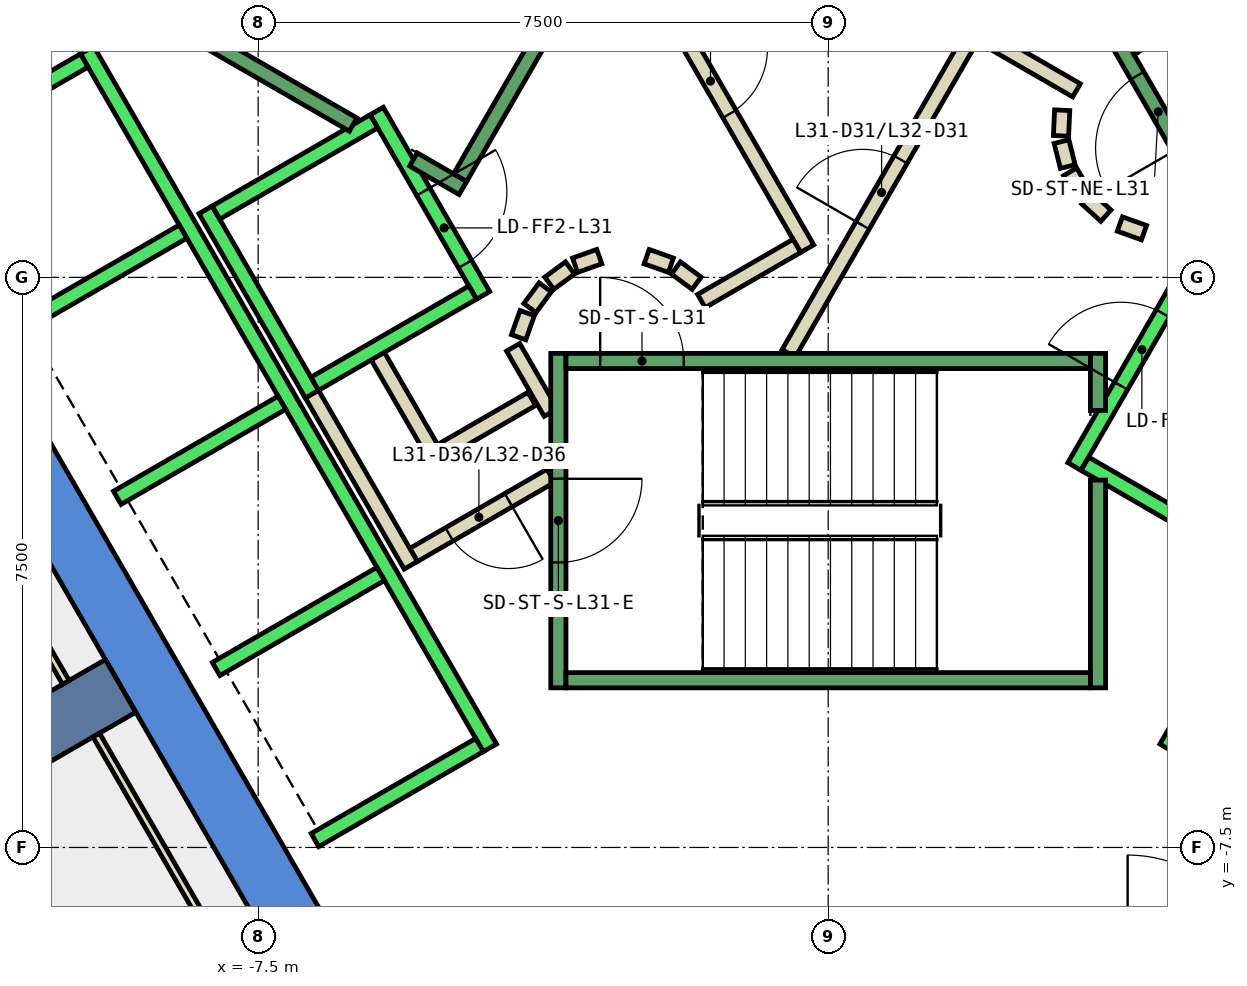
"""IFC4 building model, lengths in metres.
Left out: names, types, materials, properties, quantities, classifications, styles, units other than length and angle.
Written with IfcOpenShell. Run it as: python <this file> out.ifc"""

import sys

from ifc_helpers import new_model, si_unit, direction, frame, frame_2d, origin, place, context, subcontext, project, spatial, polyline, rectangle, outline, extrude, element, fill, save


model = new_model("IFC4")
c1 = context("Model", 3, precision=1e-05, world=origin(), true_north=direction((0.0, 1.0)))
c2 = subcontext(c1, "Body", "Model", "MODEL_VIEW")
j1 = project(units=[si_unit("LENGTHUNIT", "METRE"), si_unit("PLANEANGLEUNIT", "RADIAN")], contexts=[c1])
p1 = place(None, origin())
s1 = spatial("IfcSite", under=j1, at=p1, CompositionType="ELEMENT")
p2 = place(p1, origin())
s2 = spatial("IfcBuilding", under=s1, at=p2, CompositionType="ELEMENT")
p3 = place(p2, frame((0.0, 0.0, 142.4)))
s3 = spatial("IfcBuildingStorey", under=s2, at=p3, CompositionType="ELEMENT", Elevation=142.4)
p4 = place(p3, frame((0.0, 0.0, -0.4)))
e1 = element("IfcWall", 1, at=p4, inside=s3, PredefinedType="SHEAR", context=c2, shape_type="SweptSolid", body=[
    extrude(outline(polyline([(-13.856, 2.5), (-6.928, -9.5), (-6.466, -8.7), (-12.933, 2.5), (-13.856, 2.5)])), origin(), (0.0, 0.0, 1.0), 4.2),
])
p5 = place(p3, frame((-9.31, -5.375, -0.4), z_axis=(0.0, 0.0, 1.0), x_axis=(-0.866017533419, -0.500013631625, 0.0)))
e2 = element("IfcWall", 2, at=p5, inside=s3, PredefinedType="SHEAR", context=c2, shape_type="SweptSolid", body=[
    extrude(rectangle(XDim=9.0, YDim=0.8, at=frame_2d((4.5, 0.0))), origin(), (0.0, 0.0, 1.0), 4.2),
])
p6 = place(p3, frame((-3.9, -1.599, 0.0), z_axis=(0.0, 0.0, 1.0), x_axis=(-0.865969445389, -0.500096910261, 0.0)))
e3 = element("IfcWall", 3, at=p6, inside=s3, PredefinedType="PARTITIONING", context=c2, shape_type="SweptSolid", body=[
    extrude(rectangle(XDim=1.373, YDim=0.2, at=frame_2d((0.687, 0.0))), origin(), (0.0, 0.0, 1.0), 3.8),
])
p7 = place(p3, frame((-5.126, -2.422, 0.0), z_axis=(0.0, 0.0, 1.0), x_axis=(-0.500062241894, 0.865989465428, 0.0)))
e4 = element("IfcWall", 4, at=p7, inside=s3, PredefinedType="PARTITIONING", context=c2, shape_type="SweptSolid", body=[
    extrude(rectangle(XDim=1.7, YDim=0.2, at=frame_2d((0.85, 0.0))), origin(), (0.0, 0.0, 1.0), 3.8),
])
p8 = place(p3, frame((-3.65, -2.61, 0.0), z_axis=(0.0, 0.0, 1.0), x_axis=(-0.866072462134, -0.499918483688, 0.0)))
e5 = element("IfcWall", 5, at=p8, inside=s3, PredefinedType="PARTITIONING", context=c2, shape_type="SweptSolid", body=[
    extrude(rectangle(XDim=2.084, YDim=0.2, at=frame_2d((1.042, 0.0))), origin(), (0.0, 0.0, 1.0), 3.8),
])
p9 = place(p8, frame((0.642, 0.0, 0.0)))
e6 = element("IfcOpeningElement", 6, at=p9, cuts=e5, PredefinedType="OPENING", context=c2, shape_type="SweptSolid", body=[
    extrude(rectangle(XDim=0.9, YDim=2.1, at=frame_2d((0.45, 1.05))), frame((0.0, 0.11, 0.0), z_axis=(0.0, -1.0, 0.0), x_axis=(1.0, 0.0, 0.0)), (0.0, 0.0, 1.0), 0.22),
])
p10 = place(p3, frame((-5.492, -3.788, 0.0), z_axis=(0.0, 0.0, 1.0), x_axis=(-0.500008949224, 0.866020236886, 0.0)))
e7 = element("IfcWall", 7, at=p10, inside=s3, PredefinedType="PARTITIONING", context=c2, shape_type="SweptSolid", body=[
    extrude(rectangle(XDim=2.68, YDim=0.2, at=frame_2d((1.34, 0.0))), origin(), (0.0, 0.0, 1.0), 3.8),
])
p11 = place(p3, frame((-4.145, -0.92, 0.0), z_axis=(0.0, 0.0, 1.0), x_axis=(0.499743786207, -0.866173278362, 0.0)))
e8 = element("IfcWall", 8, at=p11, inside=s3, PredefinedType="PARTITIONING", context=c2, shape_type="SweptSolid", body=[
    extrude(rectangle(XDim=0.991, YDim=0.2, at=frame_2d((0.495, 0.0))), origin(), (0.0, 0.0, 1.0), 3.8),
])
p12 = place(p3, frame((-0.52, -1.0, 0.0), z_axis=(0.0, 0.0, 1.0), x_axis=(0.50011622646, 0.865958290007, 0.0)))
e9 = element("IfcWall", 9, at=p12, inside=s3, PredefinedType="PARTITIONING", context=c2, shape_type="SweptSolid", body=[
    extrude(rectangle(XDim=4.991, YDim=0.2, at=frame_2d((2.496, 0.0))), origin(), (0.0, 0.0, 1.0), 3.8),
])
p13 = place(p12, frame((1.945, 0.0, 0.0)))
e10 = element("IfcOpeningElement", 10, at=p13, cuts=e9, PredefinedType="OPENING", context=c2, shape_type="SweptSolid", body=[
    extrude(rectangle(XDim=1.0, YDim=2.1, at=frame_2d((0.5, 1.05))), frame((0.0, 0.11, 0.0), z_axis=(0.0, -1.0, 0.0), x_axis=(1.0, 0.0, 0.0)), (0.0, 0.0, 1.0), 0.22),
])
p14 = place(p3, frame((2.012, 3.186, 0.0), z_axis=(0.0, 0.0, 1.0), x_axis=(0.865891012941, -0.500232699559, 0.0)))
e11 = element("IfcWall", 11, at=p14, inside=s3, PredefinedType="PARTITIONING", context=c2, shape_type="SweptSolid", body=[
    extrude(rectangle(XDim=1.449, YDim=0.2, at=frame_2d((0.725, 0.0))), origin(), (0.0, 0.0, 1.0), 3.8),
])
p15 = place(p3, frame((3.079, 2.199, 0.0), z_axis=(0.0, 0.0, 1.0), x_axis=(-0.047771483479, -0.998858290933, 0.0)))
e12 = element("IfcWall", 12, at=p15, inside=s3, PredefinedType="PARTITIONING", context=c2, shape_type="SweptSolid", body=[
    extrude(rectangle(XDim=0.337, YDim=0.2, at=frame_2d((0.169, 0.0))), origin(), (0.0, 0.0, 1.0), 3.8),
])
p16 = place(p3, frame((3.07, 1.786, 0.0), z_axis=(0.0, 0.0, 1.0), x_axis=(0.242705583207, -0.970099994784, 0.0)))
e13 = element("IfcWall", 13, at=p16, inside=s3, PredefinedType="PARTITIONING", context=c2, shape_type="SweptSolid", body=[
    extrude(rectangle(XDim=0.338, YDim=0.2, at=frame_2d((0.169, 0.0))), origin(), (0.0, 0.0, 1.0), 3.8),
])
for number, where, z_axis, x_axis in (
    (14, (3.182, 1.388, 0.0), (0.0, 0.0, 1.0), (0.512, -0.859, 0.0)),
    (15, (3.404, 1.039, 0.0), (0.0, 0.0, 1.0), (0.74, -0.672, 0.0)),
):
    element("IfcWall", number, at=place(p3, frame(where, z_axis=z_axis, x_axis=x_axis)), inside=s3, PredefinedType="PARTITIONING", context=c2, shape_type="SweptSolid", body=[
        extrude(rectangle(XDim=0.338, YDim=0.2, at=frame_2d((0.169, 0.0))), origin(), (0.0, 0.0, 1.0), 3.8),
    ])
p17 = place(p3, frame((3.838, 0.702, 0.0), z_axis=(0.0, 0.0, 1.0), x_axis=(0.941035081519, -0.338308993895, 0.0)))
e16 = element("IfcWall", 16, at=p17, inside=s3, PredefinedType="PARTITIONING", context=c2, shape_type="SweptSolid", body=[
    extrude(rectangle(XDim=0.337, YDim=0.2, at=frame_2d((0.168, 0.0))), origin(), (0.0, 0.0, 1.0), 3.8),
])
p18 = place(p3, frame((-2.771, 4.7, 0.0), z_axis=(0.0, 0.0, 1.0), x_axis=(0.499969479948, -0.866043023828, 0.0)))
e17 = element("IfcWall", 17, at=p18, inside=s3, PredefinedType="PARTITIONING", context=c2, shape_type="SweptSolid", body=[
    extrude(rectangle(XDim=4.99, YDim=0.2, at=frame_2d((2.495, 0.0))), origin(), (0.0, 0.0, 1.0), 3.8),
])
p19 = place(p18, frame((1.945, 0.0, 0.0)))
e18 = element("IfcOpeningElement", 18, at=p19, cuts=e17, PredefinedType="OPENING", context=c2, shape_type="SweptSolid", body=[
    extrude(rectangle(XDim=1.0, YDim=2.1, at=frame_2d((0.5, 1.05))), frame((0.0, 0.11, 0.0), z_axis=(0.0, -1.0, 0.0), x_axis=(1.0, 0.0, 0.0)), (0.0, 0.0, 1.0), 0.22),
])
p20 = place(p3, frame((-0.412, 0.414, 0.0), z_axis=(0.0, 0.0, 1.0), x_axis=(-0.866017369001, -0.500013916395, 0.0)))
e19 = element("IfcWall", 19, at=p20, inside=s3, PredefinedType="PARTITIONING", context=c2, shape_type="SweptSolid", body=[
    extrude(rectangle(XDim=1.45, YDim=0.2, at=frame_2d((0.725, 0.0))), origin(), (0.0, 0.0, 1.0), 3.8),
])
p21 = place(p3, frame((-1.731, -0.077, 0.0), z_axis=(0.0, 0.0, 1.0), x_axis=(-0.804311165252, 0.594208338422, 0.0)))
e20 = element("IfcWall", 20, at=p21, inside=s3, PredefinedType="PARTITIONING", context=c2, shape_type="SweptSolid", body=[
    extrude(rectangle(XDim=0.338, YDim=0.2, at=frame_2d((0.169, 0.0))), origin(), (0.0, 0.0, 1.0), 3.8),
])
p22 = place(p3, frame((-2.07, 0.16, 0.0), z_axis=(0.0, 0.0, 1.0), x_axis=(-0.942199461132, 0.335052496547, 0.0)))
e21 = element("IfcWall", 21, at=p22, inside=s3, PredefinedType="PARTITIONING", context=c2, shape_type="SweptSolid", body=[
    extrude(rectangle(XDim=0.337, YDim=0.2, at=frame_2d((0.169, 0.0))), origin(), (0.0, 0.0, 1.0), 3.8),
])
p23 = place(p3, frame((-3.012, 0.273, 0.0), z_axis=(0.0, 0.0, 1.0), x_axis=(-0.942280615813, -0.334824194261, 0.0)))
e22 = element("IfcWall", 22, at=p23, inside=s3, PredefinedType="PARTITIONING", context=c2, shape_type="SweptSolid", body=[
    extrude(rectangle(XDim=0.338, YDim=0.2, at=frame_2d((0.169, 0.0))), origin(), (0.0, 0.0, 1.0), 3.8),
])
p24 = place(p3, frame((-3.397, 0.124, 0.0), z_axis=(0.0, 0.0, 1.0), x_axis=(-0.804311165252, -0.594208338422, 0.0)))
e23 = element("IfcWall", 23, at=p24, inside=s3, PredefinedType="PARTITIONING", context=c2, shape_type="SweptSolid", body=[
    extrude(rectangle(XDim=0.338, YDim=0.2, at=frame_2d((0.169, 0.0))), origin(), (0.0, 0.0, 1.0), 3.8),
])
p25 = place(p3, frame((-3.723, -0.131, 0.0), z_axis=(0.0, 0.0, 1.0), x_axis=(-0.594675113454, -0.803966112121, 0.0)))
e24 = element("IfcWall", 24, at=p25, inside=s3, PredefinedType="PARTITIONING", context=c2, shape_type="SweptSolid", body=[
    extrude(rectangle(XDim=0.338, YDim=0.2, at=frame_2d((0.169, 0.0))), origin(), (0.0, 0.0, 1.0), 3.8),
])
p26 = place(p3, frame((-3.96, -0.47, 0.0), z_axis=(0.0, 0.0, 1.0), x_axis=(-0.334824194261, -0.942280615813, 0.0)))
e25 = element("IfcWall", 25, at=p26, inside=s3, PredefinedType="PARTITIONING", context=c2, shape_type="SweptSolid", body=[
    extrude(rectangle(XDim=0.338, YDim=0.2, at=frame_2d((0.169, 0.0))), origin(), (0.0, 0.0, 1.0), 3.8),
])
p27 = place(p3, frame((-7.572, -9.586, 0.0), z_axis=(0.0, 0.0, 1.0), x_axis=(-0.500037407586, 0.866003805427, 0.0)))
e26 = element("IfcWall", 26, at=p27, inside=s3, PredefinedType="PARTITIONING", context=c2, shape_type="SweptSolid", body=[
    extrude(rectangle(XDim=4.115, YDim=0.1, at=frame_2d((2.058, 0.0))), origin(), (0.0, 0.0, 1.0), 3.8),
])
p28 = place(p3, frame((-10.03, -5.329, 0.0), z_axis=(0.0, 0.0, 1.0), x_axis=(-0.499352927503, 0.866398669086, 0.0)))
e27 = element("IfcWall", 27, at=p28, inside=s3, PredefinedType="PARTITIONING", context=c2, shape_type="SweptSolid", body=[
    extrude(rectangle(XDim=0.515, YDim=0.1, at=frame_2d((0.257, 0.0))), origin(), (0.0, 0.0, 1.0), 3.8),
])
p29 = place(p3, frame((-5.94, 2.188, 0.0), z_axis=(0.0, 0.0, 1.0), x_axis=(0.49994636267, -0.866056369097, 0.0)))
e28 = element("IfcWall", 28, at=p29, inside=s3, PredefinedType="STANDARD", context=c2, shape_type="SweptSolid", body=[
    extrude(rectangle(XDim=2.8, YDim=0.2, at=frame_2d((1.4, 0.0))), origin(), (0.0, 0.0, 1.0), 3.8),
])
p30 = place(p29, frame((1.225, 0.0, 0.0)))
e29 = element("IfcOpeningElement", 29, at=p30, cuts=e28, PredefinedType="OPENING", context=c2, shape_type="SweptSolid", body=[
    extrude(rectangle(XDim=1.1, YDim=2.1, at=frame_2d((0.55, 1.05))), frame((0.0, 0.11, 0.0), z_axis=(0.0, -1.0, 0.0), x_axis=(1.0, 0.0, 0.0)), (0.0, 0.0, 1.0), 0.22),
])
p31 = place(p3, frame((-8.192, 0.888, 0.0), z_axis=(0.0, 0.0, 1.0), x_axis=(0.49994636267, -0.866056369097, 0.0)))
e30 = element("IfcWall", 30, at=p31, inside=s3, PredefinedType="STANDARD", context=c2, shape_type="SweptSolid", body=[
    extrude(rectangle(XDim=2.8, YDim=0.2, at=frame_2d((1.4, 0.0))), origin(), (0.0, 0.0, 1.0), 3.8),
])
for number, where, z_axis, x_axis in (
    (31, (-5.977, 2.052, 0.0), (0.0, 0.0, 1.0), (-0.866, -0.5, 0.0)),
    (32, (-4.677, -0.2, 0.0), (0.0, 0.0, 1.0), (-0.866, -0.5, 0.0)),
):
    element("IfcWall", number, at=place(p3, frame(where, z_axis=z_axis, x_axis=x_axis)), inside=s3, PredefinedType="STANDARD", context=c2, shape_type="SweptSolid", body=[
        extrude(rectangle(XDim=2.399, YDim=0.2, at=frame_2d((1.2, 0.0))), origin(), (0.0, 0.0, 1.0), 3.8),
    ])
p32 = place(p3, frame((-9.751, 2.99, 0.0), z_axis=(0.0, 0.0, 1.0), x_axis=(0.50000090737, -0.866024879913, 0.0)))
e33 = element("IfcWall", 33, at=p32, inside=s3, PredefinedType="STANDARD", context=c2, shape_type="SweptSolid", body=[
    extrude(rectangle(XDim=10.6, YDim=0.2, at=frame_2d((5.3, 0.0))), origin(), (0.0, 0.0, 1.0), 3.8),
])
p33 = place(p3, frame((-9.788, 2.853, 0.0), z_axis=(0.0, 0.0, 1.0), x_axis=(-0.865998541277, -0.500046524342, 0.0)))
e34 = element("IfcWall", 34, at=p33, inside=s3, PredefinedType="STANDARD", context=c2, shape_type="SweptSolid", body=[
    extrude(rectangle(XDim=2.5, YDim=0.2, at=frame_2d((1.25, 0.0))), origin(), (0.0, 0.0, 1.0), 3.8),
])
for number, where, z_axis, x_axis in (
    (35, (-8.488, 0.602, 0.0), (0.0, 0.0, 1.0), (-0.866, -0.5, 0.0)),
    (36, (-7.188, -1.65, 0.0), (0.0, 0.0, 1.0), (-0.866, -0.5, 0.0)),
    (37, (-5.888, -3.902, 0.0), (0.0, 0.0, 1.0), (-0.866, -0.5, 0.0)),
    (38, (-4.588, -6.153, 0.0), (0.0, 0.0, 1.0), (-0.866, -0.5, 0.0)),
):
    element("IfcWall", number, at=place(p3, frame(where, z_axis=z_axis, x_axis=x_axis)), inside=s3, PredefinedType="STANDARD", context=c2, shape_type="SweptSolid", body=[
        extrude(rectangle(XDim=2.5, YDim=0.2, at=frame_2d((1.25, 0.0))), origin(), (0.0, 0.0, 1.0), 3.8),
    ])
p34 = place(p3, frame((3.24, -2.488, 0.0), z_axis=(0.0, 0.0, 1.0), x_axis=(0.49994636267, 0.866056369097, 0.0)))
e39 = element("IfcWall", 39, at=p34, inside=s3, PredefinedType="STANDARD", context=c2, shape_type="SweptSolid", body=[
    extrude(rectangle(XDim=2.8, YDim=0.2, at=frame_2d((1.4, 0.0))), origin(), (0.0, 0.0, 1.0), 3.8),
])
p35 = place(p34, frame((1.225, 0.0, 0.0)))
e40 = element("IfcOpeningElement", 40, at=p35, cuts=e39, PredefinedType="OPENING", context=c2, shape_type="SweptSolid", body=[
    extrude(rectangle(XDim=1.1, YDim=2.1, at=frame_2d((0.55, 1.05))), frame((0.0, 0.11, 0.0), z_axis=(0.0, -1.0, 0.0), x_axis=(1.0, 0.0, 0.0)), (0.0, 0.0, 1.0), 0.22),
])
p36 = place(p3, frame((3.377, -2.452, 0.0), z_axis=(0.0, 0.0, 1.0), x_axis=(0.865955154139, -0.50012165622, 0.0)))
e41 = element("IfcWall", 41, at=p36, inside=s3, PredefinedType="STANDARD", context=c2, shape_type="SweptSolid", body=[
    extrude(rectangle(XDim=2.4, YDim=0.2, at=frame_2d((1.2, 0.0))), origin(), (0.0, 0.0, 1.0), 3.8),
])
p37 = place(p3, frame((4.451, -6.19, 0.0), z_axis=(0.0, 0.0, 1.0), x_axis=(0.50000090737, 0.866024879913, 0.0)))
e42 = element("IfcWall", 42, at=p37, inside=s3, PredefinedType="STANDARD", context=c2, shape_type="SweptSolid", body=[
    extrude(rectangle(XDim=10.6, YDim=0.2, at=frame_2d((5.3, 0.0))), origin(), (0.0, 0.0, 1.0), 3.8),
])
p38 = place(p3, frame((-3.55, -1.0, 0.0), z_axis=(0.0, 0.0, 1.0), x_axis=(0.0, -1.0, 0.0)))
e43 = element("IfcWall", 43, at=p38, inside=s3, PredefinedType="STANDARD", context=c2, shape_type="SweptSolid", body=[
    extrude(rectangle(XDim=4.4, YDim=0.2, at=frame_2d((2.2, 0.0))), origin(), (0.0, 0.0, 1.0), 3.8),
])
p39 = place(p38, frame((1.65, 0.0, 0.0)))
e44 = element("IfcOpeningElement", 44, at=p39, cuts=e43, PredefinedType="OPENING", context=c2, shape_type="SweptSolid", body=[
    extrude(rectangle(XDim=1.1, YDim=2.2, at=frame_2d((0.55, 1.1))), frame((0.0, 0.11, 0.0), z_axis=(0.0, -1.0, 0.0), x_axis=(1.0, 0.0, 0.0)), (0.0, 0.0, 1.0), 0.22),
])
p40 = place(p3, frame((3.55, -2.667, 0.0), z_axis=(0.0, 0.0, 1.0), x_axis=(0.0, -1.0, 0.0)))
e45 = element("IfcWall", 45, at=p40, inside=s3, PredefinedType="STANDARD", context=c2, shape_type="SweptSolid", body=[
    extrude(rectangle(XDim=2.733, YDim=0.2, at=frame_2d((1.366, 0.0))), origin(), (0.0, 0.0, 1.0), 3.8),
])
p41 = place(p3, frame((3.55, -1.0, 0.0), z_axis=(0.0, 0.0, 1.0), x_axis=(0.0, -1.0, 0.0)))
e46 = element("IfcWall", 46, at=p41, inside=s3, PredefinedType="STANDARD", context=c2, shape_type="SweptSolid", body=[
    extrude(rectangle(XDim=0.751, YDim=0.2, at=frame_2d((0.375, 0.0))), origin(), (0.0, 0.0, 1.0), 3.8),
])
p42 = place(p3, frame((-3.45, -1.1, 0.0), z_axis=(0.0, 0.0, 1.0), x_axis=(1.0, 0.0, 0.0)))
e47 = element("IfcWall", 47, at=p42, inside=s3, PredefinedType="STANDARD", context=c2, shape_type="SweptSolid", body=[
    extrude(rectangle(XDim=6.9, YDim=0.2, at=frame_2d((3.45, 0.0))), origin(), (0.0, 0.0, 1.0), 3.8),
])
p43 = place(p42, frame((0.45, 0.0, 0.0)))
e48 = element("IfcOpeningElement", 48, at=p43, cuts=e47, PredefinedType="OPENING", context=c2, shape_type="SweptSolid", body=[
    extrude(rectangle(XDim=1.1, YDim=2.2, at=frame_2d((0.55, 1.1))), frame((0.0, 0.11, 0.0), z_axis=(0.0, -1.0, 0.0), x_axis=(1.0, 0.0, 0.0)), (0.0, 0.0, 1.0), 0.22),
])
p44 = place(p3, frame((-3.45, -5.3, 0.0), z_axis=(0.0, 0.0, 1.0), x_axis=(1.0, 0.0, 0.0)))
e49 = element("IfcWall", 49, at=p44, inside=s3, PredefinedType="STANDARD", context=c2, shape_type="SweptSolid", body=[
    extrude(rectangle(XDim=6.9, YDim=0.2, at=frame_2d((3.45, 0.0))), origin(), (0.0, 0.0, 1.0), 3.8),
])
p45 = place(p3, frame((4.843, 1.312, 0.0), z_axis=(0.0, 0.0, 1.0), x_axis=(-0.499963383562, 0.866046543262, 0.0)))
e50 = element("IfcWall", 50, at=p45, inside=s3, PredefinedType="STANDARD", context=c2, shape_type="SweptSolid", body=[
    extrude(rectangle(XDim=6.9, YDim=0.2, at=frame_2d((3.45, 0.0))), origin(), (0.0, 0.0, 1.0), 3.8),
])
p46 = place(p45, frame((0.45, 0.0, 0.0)))
e51 = element("IfcOpeningElement", 51, at=p46, cuts=e50, PredefinedType="OPENING", context=c2, shape_type="SweptSolid", body=[
    extrude(rectangle(XDim=1.1, YDim=2.2, at=frame_2d((0.55, 1.1))), frame((0.0, 0.11, 0.0), z_axis=(0.0, -1.0, 0.0), x_axis=(1.0, 0.0, 0.0)), (0.0, 0.0, 1.0), 0.22),
])
p47 = place(p3, frame((-6.25, 2.01, 0.0), z_axis=(0.0, 0.0, 1.0), x_axis=(-0.86611865017, 0.499838457731, 0.0)))
e52 = element("IfcWall", 52, at=p47, inside=s3, PredefinedType="STANDARD", context=c2, shape_type="SweptSolid", body=[
    extrude(rectangle(XDim=2.733, YDim=0.2, at=frame_2d((1.366, 0.0))), origin(), (0.0, 0.0, 1.0), 3.8),
])
p48 = place(p3, frame((-4.806, 1.176, 0.0), z_axis=(0.0, 0.0, 1.0), x_axis=(-0.866558586415, 0.499075361355, 0.0)))
e53 = element("IfcWall", 53, at=p48, inside=s3, PredefinedType="STANDARD", context=c2, shape_type="SweptSolid", body=[
    extrude(rectangle(XDim=0.751, YDim=0.2, at=frame_2d((0.376, 0.0))), origin(), (0.0, 0.0, 1.0), 3.8),
])
p49 = place(p3, frame((-1.393, 7.288, 0.0), z_axis=(0.0, 0.0, 1.0), x_axis=(-0.499963383562, -0.866046543262, 0.0)))
e54 = element("IfcWall", 54, at=p49, inside=s3, PredefinedType="STANDARD", context=c2, shape_type="SweptSolid", body=[
    extrude(rectangle(XDim=6.9, YDim=0.2, at=frame_2d((3.45, 0.0))), origin(), (0.0, 0.0, 1.0), 3.8),
])
p50 = place(p49, frame((0.45, 0.0, 0.0)))
e55 = element("IfcOpeningElement", 55, at=p50, cuts=e54, PredefinedType="OPENING", context=c2, shape_type="SweptSolid", body=[
    extrude(rectangle(XDim=1.1, YDim=2.2, at=frame_2d((0.55, 1.1))), frame((0.0, 0.11, 0.0), z_axis=(0.0, -1.0, 0.0), x_axis=(1.0, 0.0, 0.0)), (0.0, 0.0, 1.0), 0.22),
])
p51 = place(p13, origin())
e56 = element("IfcDoor", 56, at=p51, inside=s3, OperationType="SINGLE_SWING_LEFT", PredefinedType="DOOR", context=c2, shape_type="SweptSolid", body=[
    extrude(rectangle(XDim=1.0, YDim=2.1, at=frame_2d((0.5, 1.05))), frame((0.0, 0.025, 0.0), z_axis=(0.0, -1.0, 0.0), x_axis=(1.0, 0.0, 0.0)), (0.0, 0.0, 1.0), 0.05),
])
fill(e10, e56)
p52 = place(p19, origin())
e57 = element("IfcDoor", 57, at=p52, inside=s3, OperationType="SINGLE_SWING_RIGHT", PredefinedType="DOOR", context=c2, shape_type="SweptSolid", body=[
    extrude(rectangle(XDim=1.0, YDim=2.1, at=frame_2d((0.5, 1.05))), frame((0.0, 0.025, 0.0), z_axis=(0.0, -1.0, 0.0), x_axis=(1.0, 0.0, 0.0)), (0.0, 0.0, 1.0), 0.05),
])
fill(e18, e57)
p53 = place(p9, origin())
e58 = element("IfcDoor", 58, at=p53, inside=s3, OperationType="SINGLE_SWING_LEFT", PredefinedType="DOOR", context=c2, shape_type="SweptSolid", body=[
    extrude(rectangle(XDim=0.9, YDim=2.1, at=frame_2d((0.45, 1.05))), frame((0.0, 0.025, 0.0), z_axis=(0.0, -1.0, 0.0), x_axis=(1.0, 0.0, 0.0)), (0.0, 0.0, 1.0), 0.05),
])
fill(e6, e58)
p54 = place(p35, origin())
e59 = element("IfcDoor", 59, at=p54, inside=s3, OperationType="SLIDING_TO_LEFT", PredefinedType="DOOR", context=c2, shape_type="SweptSolid", body=[
    extrude(rectangle(XDim=1.1, YDim=2.1, at=frame_2d((0.55, 1.05))), frame((0.0, 0.025, 0.0), z_axis=(0.0, -1.0, 0.0), x_axis=(1.0, 0.0, 0.0)), (0.0, 0.0, 1.0), 0.05),
])
fill(e40, e59)
p55 = place(p30, origin())
e60 = element("IfcDoor", 60, at=p55, inside=s3, OperationType="SLIDING_TO_LEFT", PredefinedType="DOOR", context=c2, shape_type="SweptSolid", body=[
    extrude(rectangle(XDim=1.1, YDim=2.1, at=frame_2d((0.55, 1.05))), frame((0.0, 0.025, 0.0), z_axis=(0.0, -1.0, 0.0), x_axis=(1.0, 0.0, 0.0)), (0.0, 0.0, 1.0), 0.05),
])
fill(e29, e60)
p56 = place(p43, origin())
e61 = element("IfcDoor", 61, at=p56, inside=s3, OperationType="SINGLE_SWING_LEFT", PredefinedType="DOOR", context=c2, shape_type="SweptSolid", body=[
    extrude(rectangle(XDim=1.1, YDim=2.2, at=frame_2d((0.55, 1.1))), frame((0.0, 0.025, 0.0), z_axis=(0.0, -1.0, 0.0), x_axis=(1.0, 0.0, 0.0)), (0.0, 0.0, 1.0), 0.05),
])
fill(e48, e61)
p57 = place(p39, origin())
e62 = element("IfcDoor", 62, at=p57, inside=s3, OperationType="SINGLE_SWING_LEFT", PredefinedType="DOOR", context=c2, shape_type="SweptSolid", body=[
    extrude(rectangle(XDim=1.1, YDim=2.2, at=frame_2d((0.55, 1.1))), frame((0.0, 0.025, 0.0), z_axis=(0.0, -1.0, 0.0), x_axis=(1.0, 0.0, 0.0)), (0.0, 0.0, 1.0), 0.05),
])
fill(e44, e62)
p58 = place(p46, origin())
e63 = element("IfcDoor", 63, at=p58, inside=s3, OperationType="SINGLE_SWING_LEFT", PredefinedType="DOOR", context=c2, shape_type="SweptSolid", body=[
    extrude(rectangle(XDim=1.1, YDim=2.2, at=frame_2d((0.55, 1.1))), frame((0.0, 0.025, 0.0), z_axis=(0.0, -1.0, 0.0), x_axis=(1.0, 0.0, 0.0)), (0.0, 0.0, 1.0), 0.05),
])
fill(e51, e63)
save(model, sys.argv[1])
